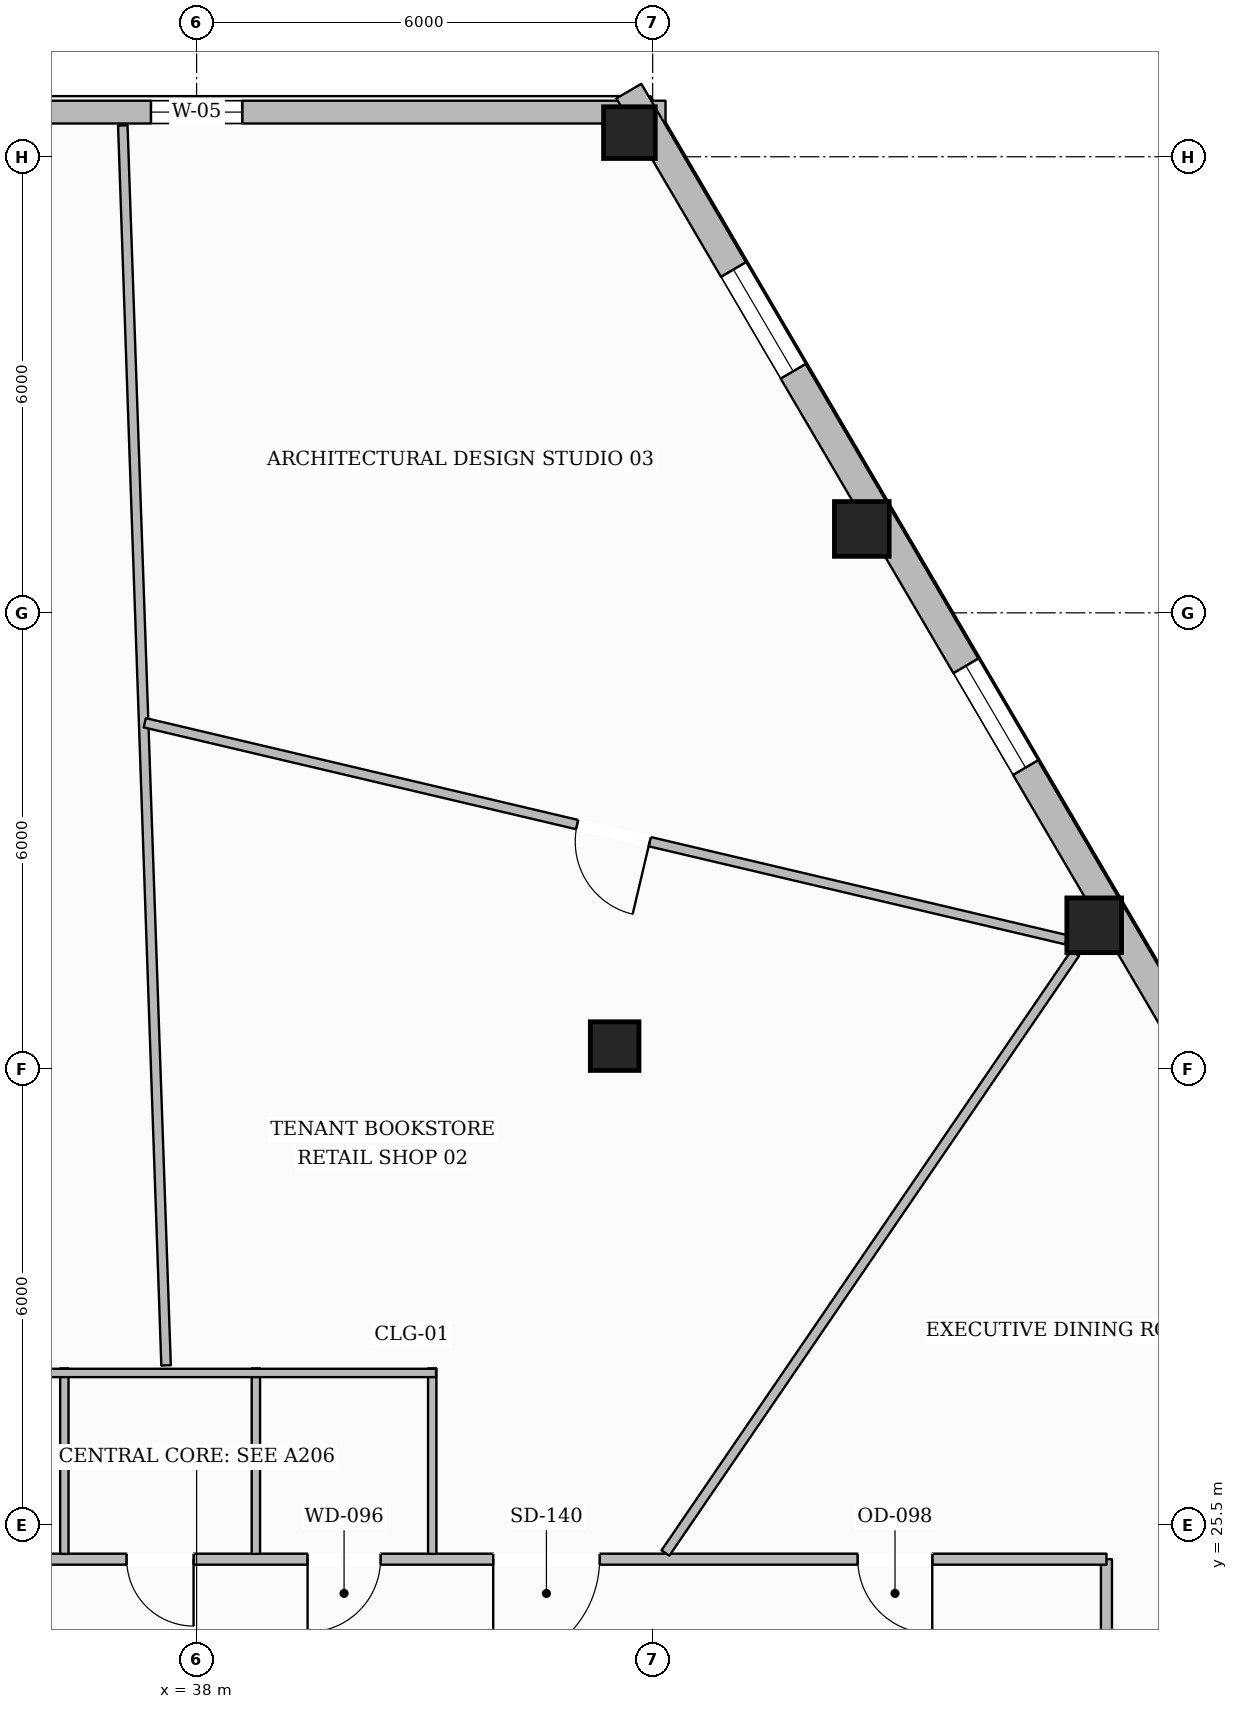
"""IFC4 building model, lengths in metres.
Left out: names, types, materials, properties, quantities, classifications, styles, units other than length and angle.
Written with IfcOpenShell. Run it as: python <this file> out.ifc"""

import sys

from ifc_helpers import new_model, si_unit, direction, frame, frame_2d, origin, origin_2d, place, context, subcontext, project, spatial, rectangle, hollow_rectangle, extrude, element, fill, save


model = new_model("IFC4")
c1 = context("Model", 3, precision=1e-05, world=origin(), true_north=direction((0.0, 1.0)))
c2 = subcontext(c1, "Body", "Model", "MODEL_VIEW")
j1 = project(units=[si_unit("LENGTHUNIT", "METRE"), si_unit("PLANEANGLEUNIT", "RADIAN")], contexts=[c1])
p1 = place(None, origin())
s1 = spatial("IfcSite", under=j1, at=p1, CompositionType="ELEMENT")
p2 = place(p1, origin())
s2 = spatial("IfcBuilding", under=s1, at=p2, CompositionType="ELEMENT")
p3 = place(p2, frame((0.0, 0.0, 131.7)))
s3 = spatial("IfcBuildingStorey", under=s2, at=p3, CompositionType="ELEMENT", Elevation=131.7)
for number, where, z_axis, x_axis in (
    (1, (49.809, 33.389, 0.0), (0.0, 0.0, 1.0), (1.0, 0.0, 0.0)),
    (2, (46.751, 38.604, 0.0), (0.0, 0.0, 1.0), (1.0, 0.0, 0.0)),
):
    element("IfcColumn", number, at=place(p3, frame(where, z_axis=z_axis, x_axis=x_axis)), inside=s3, PredefinedType="COLUMN", context=c2, shape_type="SweptSolid", body=[
        extrude(hollow_rectangle(XDim=0.72, YDim=0.72, WallThickness=0.032, at=origin_2d()), origin(), (0.0, 0.0, 1.0), 3.6),
    ])
p4 = place(p3, frame((43.694, 43.818, 0.0), z_axis=(0.0, 0.0, 1.0), x_axis=(1.0, 0.0, 0.0)))
e3 = element("IfcColumn", 3, at=p4, inside=s3, PredefinedType="COLUMN", context=c2, shape_type="SweptSolid", body=[
    extrude(hollow_rectangle(XDim=0.68, YDim=0.68, WallThickness=0.03, at=origin_2d()), origin(), (0.0, 0.0, 1.0), 3.6),
])
p5 = place(p3, frame((43.5, 31.8, 0.0), z_axis=(0.0, 0.0, 1.0), x_axis=(1.0, 0.0, 0.0)))
e4 = element("IfcColumn", 4, at=p5, inside=s3, PredefinedType="COLUMN", context=c2, shape_type="SweptSolid", body=[
    extrude(hollow_rectangle(XDim=0.64, YDim=0.64, WallThickness=0.028, at=origin_2d()), origin(), (0.0, 0.0, 1.0), 3.6),
])
p6 = place(p3, frame((31.831, 44.088, 0.0), z_axis=(0.0, 0.0, 1.0), x_axis=(1.0, 0.0, 0.0)))
e5 = element("IfcWall", 5, at=p6, inside=s3, PredefinedType="STANDARD", context=c2, shape_type="SweptSolid", body=[
    extrude(rectangle(XDim=12.338, YDim=0.3, at=frame_2d((6.169, 0.0))), origin(), (0.0, 0.0, 1.0), 3.059),
])
p7 = place(p6, frame((5.569, 0.0, 0.65)))
e6 = element("IfcOpeningElement", 6, at=p7, cuts=e5, PredefinedType="OPENING", context=c2, shape_type="SweptSolid", body=[
    extrude(rectangle(XDim=1.2, YDim=1.7, at=frame_2d((0.6, 0.85))), frame((0.0, 0.16, 0.0), z_axis=(0.0, -1.0, 0.0), x_axis=(1.0, 0.0, 0.0)), (0.0, 0.0, 1.0), 0.32),
])
p8 = place(p3, frame((43.687, 44.364, 0.0), z_axis=(0.0, 0.0, 1.0), x_axis=(0.505829244079, -0.862633627813, 0.0)))
e7 = element("IfcWall", 7, at=p8, inside=s3, PredefinedType="STANDARD", context=c2, shape_type="SweptSolid", body=[
    extrude(rectangle(XDim=37.223, YDim=0.38, at=frame_2d((18.611, 0.0))), origin(), (0.0, 0.0, 1.0), 3.059),
])
p9 = place(p8, frame((32.944, 0.0, 0.65)))
e8 = element("IfcOpeningElement", 8, at=p9, cuts=e7, PredefinedType="OPENING", context=c2, shape_type="SweptSolid", body=[
    extrude(rectangle(XDim=1.55, YDim=1.75, at=frame_2d((0.775, 0.875))), frame((0.0, 0.2, 0.0), z_axis=(0.0, -1.0, 0.0), x_axis=(1.0, 0.0, 0.0)), (0.0, 0.0, 1.0), 0.4),
])
p10 = place(p8, frame((26.9, 0.0, 0.65)))
e9 = element("IfcOpeningElement", 9, at=p10, cuts=e7, PredefinedType="OPENING", context=c2, shape_type="SweptSolid", body=[
    extrude(rectangle(XDim=1.55, YDim=1.75, at=frame_2d((0.775, 0.875))), frame((0.0, 0.2, 0.0), z_axis=(0.0, -1.0, 0.0), x_axis=(1.0, 0.0, 0.0)), (0.0, 0.0, 1.0), 0.4),
])
p11 = place(p8, frame((14.811, 0.0, 0.65)))
e10 = element("IfcOpeningElement", 10, at=p11, cuts=e7, PredefinedType="OPENING", context=c2, shape_type="SweptSolid", body=[
    extrude(rectangle(XDim=1.55, YDim=1.75, at=frame_2d((0.775, 0.875))), frame((0.0, 0.2, 0.0), z_axis=(0.0, -1.0, 0.0), x_axis=(1.0, 0.0, 0.0)), (0.0, 0.0, 1.0), 0.4),
])
p12 = place(p8, frame((8.767, 0.0, 0.65)))
e11 = element("IfcOpeningElement", 11, at=p12, cuts=e7, PredefinedType="OPENING", context=c2, shape_type="SweptSolid", body=[
    extrude(rectangle(XDim=1.55, YDim=1.75, at=frame_2d((0.775, 0.875))), frame((0.0, 0.2, 0.0), z_axis=(0.0, -1.0, 0.0), x_axis=(1.0, 0.0, 0.0)), (0.0, 0.0, 1.0), 0.4),
])
p13 = place(p8, frame((2.722, 0.0, 0.65)))
e12 = element("IfcOpeningElement", 12, at=p13, cuts=e7, PredefinedType="OPENING", context=c2, shape_type="SweptSolid", body=[
    extrude(rectangle(XDim=1.55, YDim=1.75, at=frame_2d((0.775, 0.875))), frame((0.0, 0.2, 0.0), z_axis=(0.0, -1.0, 0.0), x_axis=(1.0, 0.0, 0.0)), (0.0, 0.0, 1.0), 0.4),
])
p14 = place(p3, frame((49.97, 7.15, 0.0), z_axis=(0.0, 0.0, 1.0), x_axis=(0.0, 1.0, 0.0)))
e13 = element("IfcWall", 13, at=p14, inside=s3, PredefinedType="PARTITIONING", context=c2, shape_type="SweptSolid", body=[
    extrude(rectangle(XDim=17.9, YDim=0.145, at=frame_2d((8.95, 0.0))), origin(), (0.0, 0.0, 1.0), 3.288),
])
p15 = place(p14, frame((7.874, 0.0, 0.0)))
e14 = element("IfcOpeningElement", 14, at=p15, cuts=e13, PredefinedType="OPENING", context=c2, shape_type="SweptSolid", body=[
    extrude(rectangle(XDim=1.4, YDim=2.2, at=frame_2d((0.7, 1.1))), frame((0.0, 0.083, 0.0), z_axis=(0.0, -1.0, 0.0), x_axis=(1.0, 0.0, 0.0)), (0.0, 0.0, 1.0), 0.165),
])
p16 = place(p3, frame((49.97, 25.05, 0.0), z_axis=(0.0, 0.0, 1.0), x_axis=(-1.0, 0.0, 0.0)))
e15 = element("IfcWall", 15, at=p16, inside=s3, PredefinedType="PARTITIONING", context=c2, shape_type="SweptSolid", body=[
    extrude(rectangle(XDim=23.94, YDim=0.145, at=frame_2d((11.97, 0.0))), origin(), (0.0, 0.0, 1.0), 3.6),
])
p17 = place(p16, frame((14.53, 0.0, 0.0)))
e16 = element("IfcOpeningElement", 16, at=p17, cuts=e15, PredefinedType="OPENING", context=c2, shape_type="SweptSolid", body=[
    extrude(rectangle(XDim=0.88, YDim=2.1, at=frame_2d((0.44, 1.05))), frame((0.0, 0.083, 0.0), z_axis=(0.0, -1.0, 0.0), x_axis=(1.0, 0.0, 0.0)), (0.0, 0.0, 1.0), 0.165),
])
p18 = place(p16, frame((12.01, 0.0, 0.0)))
e17 = element("IfcOpeningElement", 17, at=p18, cuts=e15, PredefinedType="OPENING", context=c2, shape_type="SweptSolid", body=[
    extrude(rectangle(XDim=0.88, YDim=2.1, at=frame_2d((0.44, 1.05))), frame((0.0, 0.083, 0.0), z_axis=(0.0, -1.0, 0.0), x_axis=(1.0, 0.0, 0.0)), (0.0, 0.0, 1.0), 0.165),
])
p19 = place(p16, frame((9.55, 0.0, 0.0)))
e18 = element("IfcOpeningElement", 18, at=p19, cuts=e15, PredefinedType="OPENING", context=c2, shape_type="SweptSolid", body=[
    extrude(rectangle(XDim=0.96, YDim=2.1, at=frame_2d((0.48, 1.05))), frame((0.0, 0.083, 0.0), z_axis=(0.0, -1.0, 0.0), x_axis=(1.0, 0.0, 0.0)), (0.0, 0.0, 1.0), 0.165),
])
p20 = place(p16, frame((2.292, 0.0, 0.0)))
e19 = element("IfcOpeningElement", 19, at=p20, cuts=e15, PredefinedType="OPENING", context=c2, shape_type="SweptSolid", body=[
    extrude(rectangle(XDim=0.98, YDim=2.15, at=frame_2d((0.49, 1.075))), frame((0.0, 0.083, 0.0), z_axis=(0.0, -1.0, 0.0), x_axis=(1.0, 0.0, 0.0)), (0.0, 0.0, 1.0), 0.165),
])
p21 = place(p16, frame((6.668, 0.0, 0.0)))
e20 = element("IfcOpeningElement", 20, at=p21, cuts=e15, PredefinedType="OPENING", context=c2, shape_type="SweptSolid", body=[
    extrude(rectangle(XDim=1.4, YDim=2.2, at=frame_2d((0.7, 1.1))), frame((0.0, 0.083, 0.0), z_axis=(0.0, -1.0, 0.0), x_axis=(1.0, 0.0, 0.0)), (0.0, 0.0, 1.0), 0.165),
])
p22 = place(p16, frame((18.901, 0.0, 0.0)))
e21 = element("IfcOpeningElement", 21, at=p22, cuts=e15, PredefinedType="OPENING", context=c2, shape_type="SweptSolid", body=[
    extrude(rectangle(XDim=1.4, YDim=2.2, at=frame_2d((0.7, 1.1))), frame((0.0, 0.083, 0.0), z_axis=(0.0, -1.0, 0.0), x_axis=(1.0, 0.0, 0.0)), (0.0, 0.0, 1.0), 0.165),
])
for number, where, z_axis, x_axis in (
    (22, (36.26, 25.12, 0.0), (0.0, 0.0, 1.0), (0.0, 1.0, 0.0)),
    (23, (38.78, 25.12, 0.0), (0.0, 0.0, 1.0), (0.0, 1.0, 0.0)),
    (24, (41.1, 25.12, 0.0), (0.0, 0.0, 1.0), (0.0, 1.0, 0.0)),
):
    element("IfcWall", number, at=place(p3, frame(where, z_axis=z_axis, x_axis=x_axis)), inside=s3, PredefinedType="PLUMBINGWALL", context=c2, shape_type="SweptSolid", body=[
        extrude(rectangle(XDim=2.44, YDim=0.11, at=frame_2d((1.22, 0.0))), origin(), (0.0, 0.0, 1.0), 3.6),
    ])
p23 = place(p3, frame((33.69, 27.5, 0.0), z_axis=(0.0, 0.0, 1.0), x_axis=(1.0, 0.0, 0.0)))
e25 = element("IfcWall", 25, at=p23, inside=s3, PredefinedType="PLUMBINGWALL", context=c2, shape_type="SweptSolid", body=[
    extrude(rectangle(XDim=7.46, YDim=0.11, at=frame_2d((3.73, 0.0))), origin(), (0.0, 0.0, 1.0), 3.6),
])
p24 = place(p3, frame((44.168, 25.131, 0.0), z_axis=(0.0, 0.0, 1.0), x_axis=(0.564016038555, 0.825763833219, 0.0)))
e26 = element("IfcWall", 26, at=p24, inside=s3, PredefinedType="PARTITIONING", context=c2, shape_type="SweptSolid", body=[
    extrude(rectangle(XDim=9.556, YDim=0.125, at=frame_2d((4.778, 0.0))), origin(), (0.0, 0.0, 1.0), 3.6),
])
p25 = place(p3, frame((37.598, 27.6, 0.0), z_axis=(0.0, 0.0, 1.0), x_axis=(-0.034895520883, 0.99939096585, 0.0)))
e27 = element("IfcWall", 27, at=p25, inside=s3, PredefinedType="PARTITIONING", context=c2, shape_type="SweptSolid", body=[
    extrude(rectangle(XDim=16.323, YDim=0.125, at=frame_2d((8.161, 0.0))), origin(), (0.0, 0.0, 1.0), 3.6),
])
p26 = place(p3, frame((49.441, 33.199, 0.0), z_axis=(0.0, 0.0, 1.0), x_axis=(-0.973375761663, 0.229215240784, 0.0)))
e28 = element("IfcWall", 28, at=p26, inside=s3, PredefinedType="PARTITIONING", context=c2, shape_type="SweptSolid", body=[
    extrude(rectangle(XDim=12.454, YDim=0.125, at=frame_2d((6.227, 0.0))), origin(), (0.0, 0.0, 1.0), 3.6),
])
p27 = place(p26, frame((5.63, 0.0, 0.0)))
e29 = element("IfcOpeningElement", 29, at=p27, cuts=e28, PredefinedType="OPENING", context=c2, shape_type="SweptSolid", body=[
    extrude(rectangle(XDim=0.98, YDim=2.15, at=frame_2d((0.49, 1.075))), frame((0.0, 0.073, 0.0), z_axis=(0.0, -1.0, 0.0), x_axis=(1.0, 0.0, 0.0)), (0.0, 0.0, 1.0), 0.145),
])
p28 = place(p12, origin())
e30 = element("IfcWindow", 30, at=p28, inside=s3, PartitioningType="SINGLE_PANEL", PredefinedType="WINDOW", context=c2, shape_type="SweptSolid", body=[
    extrude(rectangle(XDim=1.55, YDim=1.75, at=frame_2d((0.775, 0.875))), frame((0.0, 0.03, 0.0), z_axis=(0.0, -1.0, 0.0), x_axis=(1.0, 0.0, 0.0)), (0.0, 0.0, 1.0), 0.06),
])
fill(e11, e30)
p29 = place(p13, origin())
e31 = element("IfcWindow", 31, at=p29, inside=s3, PartitioningType="SINGLE_PANEL", PredefinedType="WINDOW", context=c2, shape_type="SweptSolid", body=[
    extrude(rectangle(XDim=1.55, YDim=1.75, at=frame_2d((0.775, 0.875))), frame((0.0, 0.03, 0.0), z_axis=(0.0, -1.0, 0.0), x_axis=(1.0, 0.0, 0.0)), (0.0, 0.0, 1.0), 0.06),
])
fill(e12, e31)
p30 = place(p7, origin())
e32 = element("IfcWindow", 32, at=p30, inside=s3, PartitioningType="SINGLE_PANEL", PredefinedType="WINDOW", context=c2, shape_type="SweptSolid", body=[
    extrude(rectangle(XDim=1.2, YDim=1.7, at=frame_2d((0.6, 0.85))), frame((0.0, 0.03, 0.0), z_axis=(0.0, -1.0, 0.0), x_axis=(1.0, 0.0, 0.0)), (0.0, 0.0, 1.0), 0.06),
])
fill(e6, e32)
p31 = place(p18, origin())
e33 = element("IfcDoor", 33, at=p31, inside=s3, OperationType="SINGLE_SWING_LEFT", PredefinedType="DOOR", context=c2, shape_type="SweptSolid", body=[
    extrude(rectangle(XDim=0.88, YDim=2.1, at=frame_2d((0.44, 1.05))), frame((0.0, 0.025, 0.0), z_axis=(0.0, -1.0, 0.0), x_axis=(1.0, 0.0, 0.0)), (0.0, 0.0, 1.0), 0.05),
])
fill(e17, e33)
p32 = place(p19, origin())
e34 = element("IfcDoor", 34, at=p32, inside=s3, OperationType="SINGLE_SWING_RIGHT", PredefinedType="DOOR", context=c2, shape_type="SweptSolid", body=[
    extrude(rectangle(XDim=0.96, YDim=2.1, at=frame_2d((0.48, 1.05))), frame((0.0, 0.025, 0.0), z_axis=(0.0, -1.0, 0.0), x_axis=(1.0, 0.0, 0.0)), (0.0, 0.0, 1.0), 0.05),
])
fill(e18, e34)
p33 = place(p20, origin())
e35 = element("IfcDoor", 35, at=p33, inside=s3, OperationType="SINGLE_SWING_LEFT", PredefinedType="DOOR", context=c2, shape_type="SweptSolid", body=[
    extrude(rectangle(XDim=0.98, YDim=2.15, at=frame_2d((0.49, 1.075))), frame((0.0, 0.025, 0.0), z_axis=(0.0, -1.0, 0.0), x_axis=(1.0, 0.0, 0.0)), (0.0, 0.0, 1.0), 0.05),
])
fill(e19, e35)
p34 = place(p21, origin())
e36 = element("IfcDoor", 36, at=p34, inside=s3, OperationType="SINGLE_SWING_RIGHT", PredefinedType="DOOR", context=c2, shape_type="SweptSolid", body=[
    extrude(rectangle(XDim=1.4, YDim=2.2, at=frame_2d((0.7, 1.1))), frame((0.0, 0.025, 0.0), z_axis=(0.0, -1.0, 0.0), x_axis=(1.0, 0.0, 0.0)), (0.0, 0.0, 1.0), 0.05),
])
fill(e20, e36)
p35 = place(p27, origin())
e37 = element("IfcDoor", 37, at=p35, inside=s3, OperationType="SINGLE_SWING_LEFT", PredefinedType="DOOR", context=c2, shape_type="SweptSolid", body=[
    extrude(rectangle(XDim=0.98, YDim=2.15, at=frame_2d((0.49, 1.075))), frame((0.0, 0.025, 0.0), z_axis=(0.0, -1.0, 0.0), x_axis=(1.0, 0.0, 0.0)), (0.0, 0.0, 1.0), 0.05),
])
fill(e29, e37)
save(model, sys.argv[1])
